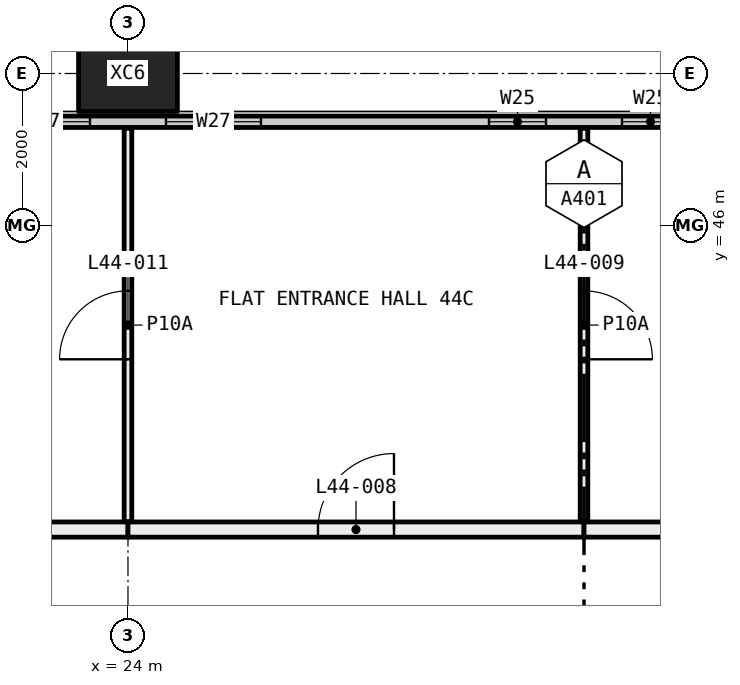
"""IFC4 building model, lengths in metres.
Left out: names, types, materials, properties, quantities, classifications, styles, units other than length and angle.
Written with IfcOpenShell. Run it as: python <this file> out.ifc"""

import sys

from ifc_helpers import new_model, si_unit, direction, frame, frame_2d, origin, origin_2d, place, context, subcontext, project, spatial, rectangle, hollow_rectangle, extrude, element, fill, save


model = new_model("IFC4")
c1 = context("Model", 3, precision=1e-05, world=origin(), true_north=direction((0.0, 1.0)))
c2 = subcontext(c1, "Body", "Model", "MODEL_VIEW")
j1 = project(units=[si_unit("LENGTHUNIT", "METRE"), si_unit("PLANEANGLEUNIT", "RADIAN")], contexts=[c1])
p1 = place(None, origin())
s1 = spatial("IfcSite", under=j1, at=p1, CompositionType="ELEMENT")
p2 = place(p1, origin())
s2 = spatial("IfcBuilding", under=s1, at=p2, CompositionType="ELEMENT")
p3 = place(p2, frame((0.0, 0.0, 168.6)))
s3 = spatial("IfcBuildingStorey", under=s2, at=p3, CompositionType="ELEMENT", Elevation=168.6)
p4 = place(p3, frame((24.0, 48.0, -0.4), z_axis=(0.0, 0.0, 1.0), x_axis=(1.0, 0.0, 0.0)))
e1 = element("IfcColumn", 1, at=p4, inside=s3, PredefinedType="COLUMN", context=c2, shape_type="SweptSolid", body=[
    extrude(hollow_rectangle(XDim=1.3, YDim=1.0, WallThickness=0.05, at=origin_2d()), origin(), (0.0, 0.0, 1.0), 3.45),
])
p5 = place(p3, frame((6.56, 47.365, 0.0), z_axis=(0.0, 0.0, 1.0), x_axis=(1.0, 0.0, 0.0)))
e2 = element("IfcWall", 2, at=p5, inside=s3, PredefinedType="ELEMENTEDWALL", context=c2, shape_type="SweptSolid", body=[
    extrude(rectangle(XDim=46.88, YDim=0.15, at=frame_2d((23.44, 0.0))), origin(), (0.0, 0.0, 1.0), 3.05),
])
p6 = place(p5, frame((0.44, 0.0, 0.45)))
e3 = element("IfcOpeningElement", 3, at=p6, cuts=e2, PredefinedType="OPENING", context=c2, shape_type="SweptSolid", body=[
    extrude(rectangle(XDim=4.5, YDim=2.55, at=frame_2d((2.25, 1.275))), frame((0.0, 0.085, 0.0), z_axis=(0.0, -1.0, 0.0), x_axis=(1.0, 0.0, 0.0)), (0.0, 0.0, 1.0), 0.17),
])
p7 = place(p5, frame((5.94, 0.0, 0.45)))
e4 = element("IfcOpeningElement", 4, at=p7, cuts=e2, PredefinedType="OPENING", context=c2, shape_type="SweptSolid", body=[
    extrude(rectangle(XDim=1.25, YDim=2.55, at=frame_2d((0.625, 1.275))), frame((0.0, 0.085, 0.0), z_axis=(0.0, -1.0, 0.0), x_axis=(1.0, 0.0, 0.0)), (0.0, 0.0, 1.0), 0.17),
])
p8 = place(p5, frame((10.19, 0.0, 0.45)))
e5 = element("IfcOpeningElement", 5, at=p8, cuts=e2, PredefinedType="OPENING", context=c2, shape_type="SweptSolid", body=[
    extrude(rectangle(XDim=0.75, YDim=2.55, at=frame_2d((0.375, 1.275))), frame((0.0, 0.085, 0.0), z_axis=(0.0, -1.0, 0.0), x_axis=(1.0, 0.0, 0.0)), (0.0, 0.0, 1.0), 0.17),
])
p9 = place(p5, frame((11.94, 0.0, 0.45)))
e6 = element("IfcOpeningElement", 6, at=p9, cuts=e2, PredefinedType="OPENING", context=c2, shape_type="SweptSolid", body=[
    extrude(rectangle(XDim=0.75, YDim=2.55, at=frame_2d((0.375, 1.275))), frame((0.0, 0.085, 0.0), z_axis=(0.0, -1.0, 0.0), x_axis=(1.0, 0.0, 0.0)), (0.0, 0.0, 1.0), 0.17),
])
p10 = place(p5, frame((15.69, 0.0, 0.45)))
e7 = element("IfcOpeningElement", 7, at=p10, cuts=e2, PredefinedType="OPENING", context=c2, shape_type="SweptSolid", body=[
    extrude(rectangle(XDim=1.25, YDim=2.55, at=frame_2d((0.625, 1.275))), frame((0.0, 0.085, 0.0), z_axis=(0.0, -1.0, 0.0), x_axis=(1.0, 0.0, 0.0)), (0.0, 0.0, 1.0), 0.17),
])
p11 = place(p5, frame((17.94, 0.0, 0.45)))
e8 = element("IfcOpeningElement", 8, at=p11, cuts=e2, PredefinedType="OPENING", context=c2, shape_type="SweptSolid", body=[
    extrude(rectangle(XDim=1.25, YDim=2.55, at=frame_2d((0.625, 1.275))), frame((0.0, 0.085, 0.0), z_axis=(0.0, -1.0, 0.0), x_axis=(1.0, 0.0, 0.0)), (0.0, 0.0, 1.0), 0.17),
])
p12 = place(p5, frame((22.19, 0.0, 0.45)))
e9 = element("IfcOpeningElement", 9, at=p12, cuts=e2, PredefinedType="OPENING", context=c2, shape_type="SweptSolid", body=[
    extrude(rectangle(XDim=0.75, YDim=2.55, at=frame_2d((0.375, 1.275))), frame((0.0, 0.085, 0.0), z_axis=(0.0, -1.0, 0.0), x_axis=(1.0, 0.0, 0.0)), (0.0, 0.0, 1.0), 0.17),
])
p13 = place(p5, frame((23.94, 0.0, 0.45)))
e10 = element("IfcOpeningElement", 10, at=p13, cuts=e2, PredefinedType="OPENING", context=c2, shape_type="SweptSolid", body=[
    extrude(rectangle(XDim=0.75, YDim=2.55, at=frame_2d((0.375, 1.275))), frame((0.0, 0.085, 0.0), z_axis=(0.0, -1.0, 0.0), x_axis=(1.0, 0.0, 0.0)), (0.0, 0.0, 1.0), 0.17),
])
p14 = place(p5, frame((27.69, 0.0, 0.45)))
e11 = element("IfcOpeningElement", 11, at=p14, cuts=e2, PredefinedType="OPENING", context=c2, shape_type="SweptSolid", body=[
    extrude(rectangle(XDim=1.25, YDim=2.55, at=frame_2d((0.625, 1.275))), frame((0.0, 0.085, 0.0), z_axis=(0.0, -1.0, 0.0), x_axis=(1.0, 0.0, 0.0)), (0.0, 0.0, 1.0), 0.17),
])
p15 = place(p5, frame((29.94, 0.0, 0.45)))
e12 = element("IfcOpeningElement", 12, at=p15, cuts=e2, PredefinedType="OPENING", context=c2, shape_type="SweptSolid", body=[
    extrude(rectangle(XDim=1.25, YDim=2.55, at=frame_2d((0.625, 1.275))), frame((0.0, 0.085, 0.0), z_axis=(0.0, -1.0, 0.0), x_axis=(1.0, 0.0, 0.0)), (0.0, 0.0, 1.0), 0.17),
])
p16 = place(p5, frame((34.19, 0.0, 0.45)))
e13 = element("IfcOpeningElement", 13, at=p16, cuts=e2, PredefinedType="OPENING", context=c2, shape_type="SweptSolid", body=[
    extrude(rectangle(XDim=0.75, YDim=2.55, at=frame_2d((0.375, 1.275))), frame((0.0, 0.085, 0.0), z_axis=(0.0, -1.0, 0.0), x_axis=(1.0, 0.0, 0.0)), (0.0, 0.0, 1.0), 0.17),
])
p17 = place(p5, frame((35.94, 0.0, 0.45)))
e14 = element("IfcOpeningElement", 14, at=p17, cuts=e2, PredefinedType="OPENING", context=c2, shape_type="SweptSolid", body=[
    extrude(rectangle(XDim=0.75, YDim=2.55, at=frame_2d((0.375, 1.275))), frame((0.0, 0.085, 0.0), z_axis=(0.0, -1.0, 0.0), x_axis=(1.0, 0.0, 0.0)), (0.0, 0.0, 1.0), 0.17),
])
p18 = place(p5, frame((39.69, 0.0, 0.45)))
e15 = element("IfcOpeningElement", 15, at=p18, cuts=e2, PredefinedType="OPENING", context=c2, shape_type="SweptSolid", body=[
    extrude(rectangle(XDim=1.25, YDim=2.55, at=frame_2d((0.625, 1.275))), frame((0.0, 0.085, 0.0), z_axis=(0.0, -1.0, 0.0), x_axis=(1.0, 0.0, 0.0)), (0.0, 0.0, 1.0), 0.17),
])
p19 = place(p5, frame((41.94, 0.0, 0.45)))
e16 = element("IfcOpeningElement", 16, at=p19, cuts=e2, PredefinedType="OPENING", context=c2, shape_type="SweptSolid", body=[
    extrude(rectangle(XDim=4.5, YDim=2.55, at=frame_2d((2.25, 1.275))), frame((0.0, 0.085, 0.0), z_axis=(0.0, -1.0, 0.0), x_axis=(1.0, 0.0, 0.0)), (0.0, 0.0, 1.0), 0.17),
])
p20 = place(p3, frame((24.0, 42.1, 0.0), z_axis=(0.0, 0.0, 1.0), x_axis=(0.0, 1.0, 0.0)))
e17 = element("IfcWall", 17, at=p20, inside=s3, PredefinedType="PARTITIONING", context=c2, shape_type="SweptSolid", body=[
    extrude(rectangle(XDim=5.18, YDim=0.1, at=frame_2d((2.59, 0.0))), origin(), (0.0, 0.0, 1.0), 3.05),
])
p21 = place(p20, frame((2.14, 0.0, 0.0)))
e18 = element("IfcOpeningElement", 18, at=p21, cuts=e17, PredefinedType="OPENING", context=c2, shape_type="SweptSolid", body=[
    extrude(rectangle(XDim=0.9, YDim=2.1, at=frame_2d((0.45, 1.05))), frame((0.0, 0.06, 0.0), z_axis=(0.0, -1.0, 0.0), x_axis=(1.0, 0.0, 0.0)), (0.0, 0.0, 1.0), 0.12),
])
p22 = place(p3, frame((18.0, 42.0, 0.0), z_axis=(0.0, 0.0, 1.0), x_axis=(1.0, 0.0, 0.0)))
e19 = element("IfcWall", 19, at=p22, inside=s3, PredefinedType="PARTITIONING", context=c2, shape_type="SweptSolid", body=[
    extrude(rectangle(XDim=6.0, YDim=0.2, at=frame_2d((3.0, 0.0))), origin(), (0.0, 0.0, 1.0), 3.05),
])
p23 = place(p3, frame((30.0, 42.1, 0.0), z_axis=(0.0, 0.0, 1.0), x_axis=(0.0, 1.0, 0.0)))
e20 = element("IfcWall", 20, at=p23, inside=s3, PredefinedType="PARTITIONING", context=c2, shape_type="SweptSolid", body=[
    extrude(rectangle(XDim=5.18, YDim=0.1, at=frame_2d((2.59, 0.0))), origin(), (0.0, 0.0, 1.0), 3.05),
])
p24 = place(p23, frame((2.14, 0.0, 0.0)))
e21 = element("IfcOpeningElement", 21, at=p24, cuts=e20, PredefinedType="OPENING", context=c2, shape_type="SweptSolid", body=[
    extrude(rectangle(XDim=0.9, YDim=2.1, at=frame_2d((0.45, 1.05))), frame((0.0, 0.06, 0.0), z_axis=(0.0, -1.0, 0.0), x_axis=(1.0, 0.0, 0.0)), (0.0, 0.0, 1.0), 0.12),
])
p25 = place(p3, frame((24.0, 42.0, 0.0), z_axis=(0.0, 0.0, 1.0), x_axis=(1.0, 0.0, 0.0)))
e22 = element("IfcWall", 22, at=p25, inside=s3, PredefinedType="PARTITIONING", context=c2, shape_type="SweptSolid", body=[
    extrude(rectangle(XDim=6.0, YDim=0.2, at=frame_2d((3.0, 0.0))), origin(), (0.0, 0.0, 1.0), 3.05),
])
p26 = place(p25, frame((2.5, 0.0, 0.0)))
e23 = element("IfcOpeningElement", 23, at=p26, cuts=e22, PredefinedType="OPENING", context=c2, shape_type="SweptSolid", body=[
    extrude(rectangle(XDim=1.0, YDim=2.1, at=frame_2d((0.5, 1.05))), frame((0.0, 0.11, 0.0), z_axis=(0.0, -1.0, 0.0), x_axis=(1.0, 0.0, 0.0)), (0.0, 0.0, 1.0), 0.22),
])
p27 = place(p3, frame((30.0, 42.0, 0.0), z_axis=(0.0, 0.0, 1.0), x_axis=(1.0, 0.0, 0.0)))
e24 = element("IfcWall", 24, at=p27, inside=s3, PredefinedType="PARTITIONING", context=c2, shape_type="SweptSolid", body=[
    extrude(rectangle(XDim=6.1, YDim=0.2, at=frame_2d((3.05, 0.0))), origin(), (0.0, 0.0, 1.0), 2.45),
])
p28 = place(p10, origin())
e25 = element("IfcWindow", 25, at=p28, inside=s3, PartitioningType="SINGLE_PANEL", PredefinedType="WINDOW", context=c2, shape_type="SweptSolid", body=[
    extrude(rectangle(XDim=1.25, YDim=2.55, at=frame_2d((0.625, 1.275))), frame((0.0, 0.03, 0.0), z_axis=(0.0, -1.0, 0.0), x_axis=(1.0, 0.0, 0.0)), (0.0, 0.0, 1.0), 0.06),
])
fill(e7, e25)
p29 = place(p11, origin())
e26 = element("IfcWindow", 26, at=p29, inside=s3, PartitioningType="SINGLE_PANEL", PredefinedType="WINDOW", context=c2, shape_type="SweptSolid", body=[
    extrude(rectangle(XDim=1.25, YDim=2.55, at=frame_2d((0.625, 1.275))), frame((0.0, 0.03, 0.0), z_axis=(0.0, -1.0, 0.0), x_axis=(1.0, 0.0, 0.0)), (0.0, 0.0, 1.0), 0.06),
])
fill(e8, e26)
p30 = place(p12, origin())
e27 = element("IfcWindow", 27, at=p30, inside=s3, PartitioningType="SINGLE_PANEL", PredefinedType="WINDOW", context=c2, shape_type="SweptSolid", body=[
    extrude(rectangle(XDim=0.75, YDim=2.55, at=frame_2d((0.375, 1.275))), frame((0.0, 0.03, 0.0), z_axis=(0.0, -1.0, 0.0), x_axis=(1.0, 0.0, 0.0)), (0.0, 0.0, 1.0), 0.06),
])
fill(e9, e27)
p31 = place(p13, origin())
e28 = element("IfcWindow", 28, at=p31, inside=s3, PartitioningType="SINGLE_PANEL", PredefinedType="WINDOW", context=c2, shape_type="SweptSolid", body=[
    extrude(rectangle(XDim=0.75, YDim=2.55, at=frame_2d((0.375, 1.275))), frame((0.0, 0.03, 0.0), z_axis=(0.0, -1.0, 0.0), x_axis=(1.0, 0.0, 0.0)), (0.0, 0.0, 1.0), 0.06),
])
fill(e10, e28)
p32 = place(p26, origin())
e29 = element("IfcDoor", 29, at=p32, inside=s3, OperationType="SINGLE_SWING_LEFT", PredefinedType="DOOR", context=c2, shape_type="SweptSolid", body=[
    extrude(rectangle(XDim=1.0, YDim=2.1, at=frame_2d((0.5, 1.05))), frame((0.0, 0.025, 0.0), z_axis=(0.0, -1.0, 0.0), x_axis=(1.0, 0.0, 0.0)), (0.0, 0.0, 1.0), 0.05),
])
fill(e23, e29)
p33 = place(p24, frame((0.9, 0.0, 0.0), x_axis=(-1.0, 0.0, 0.0)))
e30 = element("IfcDoor", 30, at=p33, inside=s3, OperationType="SINGLE_SWING_LEFT", PredefinedType="DOOR", context=c2, shape_type="SweptSolid", body=[
    extrude(rectangle(XDim=0.9, YDim=2.1, at=frame_2d((0.45, 1.05))), frame((0.0, 0.025, 0.0), z_axis=(0.0, -1.0, 0.0), x_axis=(1.0, 0.0, 0.0)), (0.0, 0.0, 1.0), 0.05),
])
fill(e21, e30)
p34 = place(p21, origin())
e31 = element("IfcDoor", 31, at=p34, inside=s3, OperationType="SINGLE_SWING_RIGHT", PredefinedType="DOOR", context=c2, shape_type="SweptSolid", body=[
    extrude(rectangle(XDim=0.9, YDim=2.1, at=frame_2d((0.45, 1.05))), frame((0.0, 0.025, 0.0), z_axis=(0.0, -1.0, 0.0), x_axis=(1.0, 0.0, 0.0)), (0.0, 0.0, 1.0), 0.05),
])
fill(e18, e31)
save(model, sys.argv[1])
